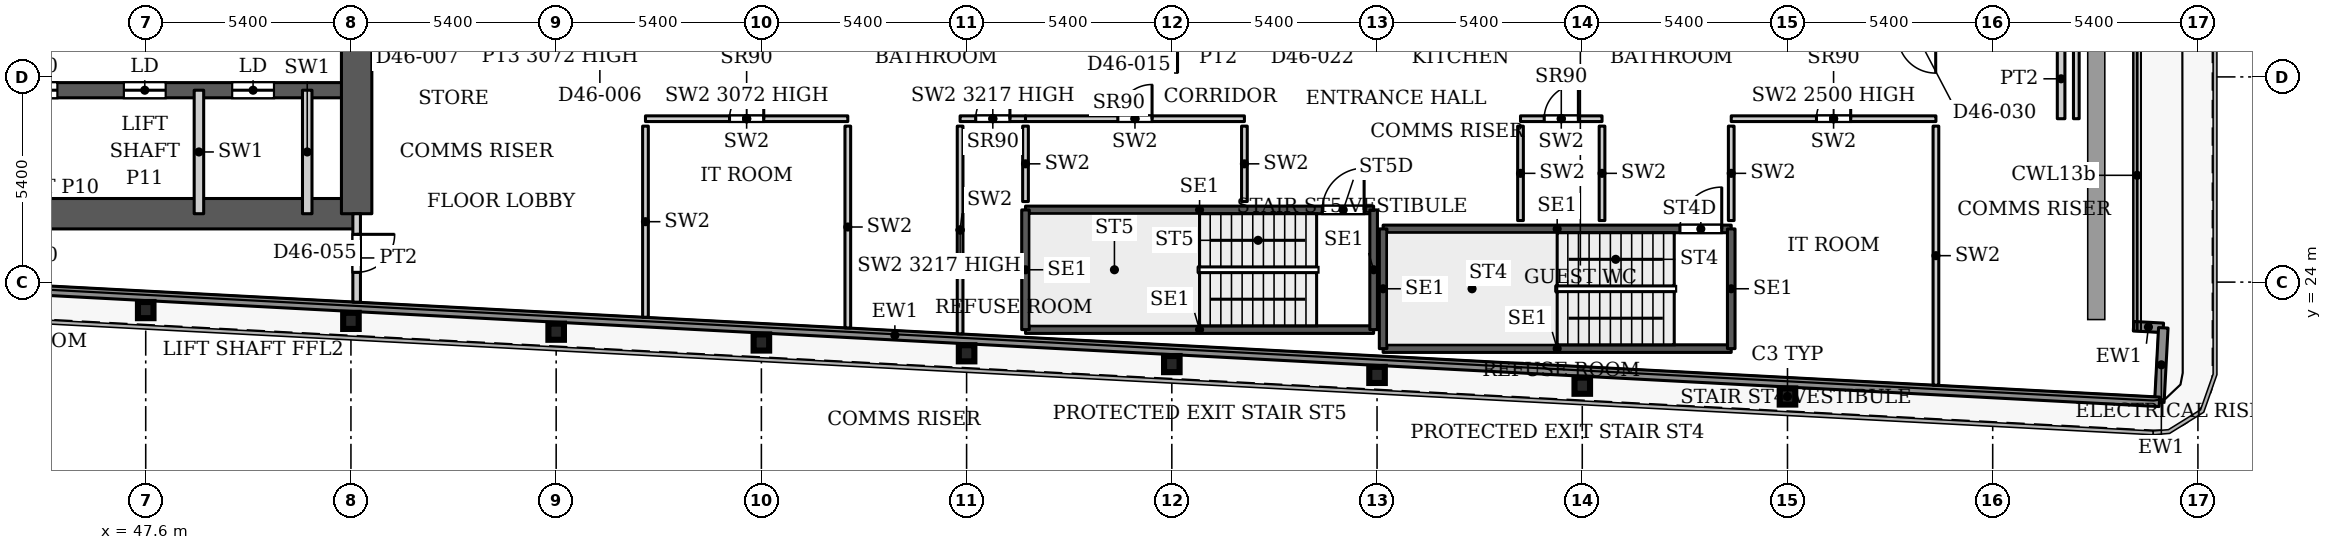
"""IFC4 building model, lengths in metres.
Left out: names, types, materials, properties, quantities, classifications, styles, units other than length and angle.
Written with IfcOpenShell. Run it as: python <this file> out.ifc"""

import sys

from ifc_helpers import new_model, si_unit, direction, frame, frame_2d, origin, origin_2d, place, context, subcontext, project, spatial, rectangle, i_section, extrude, source, transform, mapped, element, fill, save


model = new_model("IFC4")
c1 = context("Model", 3, precision=1e-05, world=origin(), true_north=direction((0.0, 1.0)))
c2 = subcontext(c1, "Body", "Model", "MODEL_VIEW")
j1 = project(units=[si_unit("LENGTHUNIT", "METRE"), si_unit("PLANEANGLEUNIT", "RADIAN")], contexts=[c1])
p1 = place(None, origin())
s1 = spatial("IfcSite", under=j1, at=p1, CompositionType="ELEMENT")
p2 = place(p1, origin())
s2 = spatial("IfcBuilding", under=s1, at=p2, CompositionType="ELEMENT")
p3 = place(p2, frame((0.0, 0.0, 199.4)))
s3 = spatial("IfcBuildingStorey", under=s2, at=p3, CompositionType="ELEMENT", Elevation=199.4)
for number, where, z_axis, x_axis in (
    (1, (90.8, 20.99, 0.0), (0.0, 0.0, 1.0), (1.0, 0.0, 0.0)),
    (2, (85.4, 21.274, 0.0), (0.0, 0.0, 1.0), (1.0, 0.0, 0.0)),
    (3, (80.0, 21.558, 0.0), (0.0, 0.0, 1.0), (1.0, 0.0, 0.0)),
    (4, (74.6, 21.843, 0.0), (0.0, 0.0, 1.0), (1.0, 0.0, 0.0)),
    (5, (69.2, 22.127, 0.0), (0.0, 0.0, 1.0), (1.0, 0.0, 0.0)),
    (6, (63.8, 22.411, 0.0), (0.0, 0.0, 1.0), (1.0, 0.0, 0.0)),
    (7, (58.4, 22.695, 0.0), (0.0, 0.0, 1.0), (1.0, 0.0, 0.0)),
    (8, (53.0, 22.98, 0.0), (0.0, 0.0, 1.0), (1.0, 0.0, 0.0)),
    (9, (47.6, 23.264, 0.0), (0.0, 0.0, 1.0), (1.0, 0.0, 0.0)),
):
    element("IfcColumn", number, at=place(p3, frame(where, z_axis=z_axis, x_axis=x_axis)), inside=s3, PredefinedType="COLUMN", context=c2, shape_type="SweptSolid", body=[
        extrude(i_section(OverallWidth=0.409, OverallDepth=0.425, WebThickness=0.033, FlangeThickness=0.052, FilletRadius=0.013, at=origin_2d()), origin(), (0.0, 0.0, 1.0), 3.9),
    ])
p4 = place(p3, frame((34.75, 25.8, 0.0), z_axis=(0.0, 0.0, 1.0), x_axis=(1.0, 0.0, 0.0)))
e10 = element("IfcWall", 10, at=p4, inside=s3, PredefinedType="SHEAR", context=c2, shape_type="SweptSolid", body=[
    extrude(rectangle(XDim=18.4, YDim=0.8, at=frame_2d((9.2, 0.0))), origin(), (0.0, 0.0, 1.0), 3.9),
])
p5 = place(p3, frame((34.75, 29.05, 0.0), z_axis=(0.0, 0.0, 1.0), x_axis=(1.0, 0.0, 0.0)))
e11 = element("IfcWall", 11, at=p5, inside=s3, PredefinedType="SHEAR", context=c2, shape_type="SweptSolid", body=[
    extrude(rectangle(XDim=18.4, YDim=0.4, at=frame_2d((9.2, 0.0))), origin(), (0.0, 0.0, 1.0), 3.9),
])
p6 = place(p5, frame((0.875, 0.0, 0.0)))
e12 = element("IfcOpeningElement", 12, at=p6, cuts=e11, PredefinedType="OPENING", context=c2, shape_type="SweptSolid", body=[
    extrude(rectangle(XDim=1.1, YDim=2.2, at=frame_2d((0.55, 1.1))), frame((0.0, 0.21, 0.0), z_axis=(0.0, -1.0, 0.0), x_axis=(1.0, 0.0, 0.0)), (0.0, 0.0, 1.0), 0.42),
])
p7 = place(p5, frame((3.725, 0.0, 0.0)))
e13 = element("IfcOpeningElement", 13, at=p7, cuts=e11, PredefinedType="OPENING", context=c2, shape_type="SweptSolid", body=[
    extrude(rectangle(XDim=1.1, YDim=2.2, at=frame_2d((0.55, 1.1))), frame((0.0, 0.21, 0.0), z_axis=(0.0, -1.0, 0.0), x_axis=(1.0, 0.0, 0.0)), (0.0, 0.0, 1.0), 0.42),
])
p8 = place(p5, frame((6.575, 0.0, 0.0)))
e14 = element("IfcOpeningElement", 14, at=p8, cuts=e11, PredefinedType="OPENING", context=c2, shape_type="SweptSolid", body=[
    extrude(rectangle(XDim=1.1, YDim=2.2, at=frame_2d((0.55, 1.1))), frame((0.0, 0.21, 0.0), z_axis=(0.0, -1.0, 0.0), x_axis=(1.0, 0.0, 0.0)), (0.0, 0.0, 1.0), 0.42),
])
p9 = place(p5, frame((9.425, 0.0, 0.0)))
e15 = element("IfcOpeningElement", 15, at=p9, cuts=e11, PredefinedType="OPENING", context=c2, shape_type="SweptSolid", body=[
    extrude(rectangle(XDim=1.1, YDim=2.2, at=frame_2d((0.55, 1.1))), frame((0.0, 0.21, 0.0), z_axis=(0.0, -1.0, 0.0), x_axis=(1.0, 0.0, 0.0)), (0.0, 0.0, 1.0), 0.42),
])
p10 = place(p5, frame((12.275, 0.0, 0.0)))
e16 = element("IfcOpeningElement", 16, at=p10, cuts=e11, PredefinedType="OPENING", context=c2, shape_type="SweptSolid", body=[
    extrude(rectangle(XDim=1.1, YDim=2.2, at=frame_2d((0.55, 1.1))), frame((0.0, 0.21, 0.0), z_axis=(0.0, -1.0, 0.0), x_axis=(1.0, 0.0, 0.0)), (0.0, 0.0, 1.0), 0.42),
])
p11 = place(p5, frame((15.125, 0.0, 0.0)))
e17 = element("IfcOpeningElement", 17, at=p11, cuts=e11, PredefinedType="OPENING", context=c2, shape_type="SweptSolid", body=[
    extrude(rectangle(XDim=1.1, YDim=2.2, at=frame_2d((0.55, 1.1))), frame((0.0, 0.21, 0.0), z_axis=(0.0, -1.0, 0.0), x_axis=(1.0, 0.0, 0.0)), (0.0, 0.0, 1.0), 0.42),
])
p12 = place(p3, frame((53.15, 25.8, 0.0), z_axis=(0.0, 0.0, 1.0), x_axis=(0.0, 1.0, 0.0)))
e18 = element("IfcWall", 18, at=p12, inside=s3, PredefinedType="SHEAR", context=c2, shape_type="SweptSolid", body=[
    extrude(rectangle(XDim=10.4, YDim=0.8, at=frame_2d((5.2, 0.0))), origin(), (0.0, 0.0, 1.0), 3.9),
])
p13 = place(p3, frame((99.907, 22.839, 0.0), z_axis=(0.0, 0.0, 1.0), x_axis=(0.998561284263, -0.053622398031, 0.0)))
e19 = element("IfcWall", 19, at=p13, inside=s3, PredefinedType="SOLIDWALL", context=c2, shape_type="SweptSolid", body=[
    extrude(rectangle(XDim=0.783, YDim=0.25, at=frame_2d((0.392, 0.0))), origin(), (0.0, 0.0, 1.0), 3.75),
])
p14 = place(p3, frame((100.689, 22.797, 0.0), z_axis=(0.0, 0.0, 1.0), x_axis=(-0.052841433274, -0.998602915542, 0.0)))
e20 = element("IfcWall", 20, at=p14, inside=s3, PredefinedType="SOLIDWALL", context=c2, shape_type="SweptSolid", body=[
    extrude(rectangle(XDim=1.95, YDim=0.25, at=frame_2d((0.975, 0.0))), origin(), (0.0, 0.0, 1.0), 3.75),
])
p15 = place(p3, frame((100.586, 20.85, 0.0), z_axis=(0.0, 0.0, 1.0), x_axis=(-0.99861746497, 0.052565755559, 0.0)))
e21 = element("IfcWall", 21, at=p15, inside=s3, PredefinedType="SOLIDWALL", context=c2, shape_type="SweptSolid", body=[
    extrude(rectangle(XDim=66.639, YDim=0.25, at=frame_2d((33.319, 0.0))), origin(), (0.0, 0.0, 1.0), 3.75),
])
p16 = place(p3, frame((80.16, 22.25, 0.0), z_axis=(0.0, 0.0, 1.0), x_axis=(1.0, 0.0, 0.0)))
e22 = element("IfcWall", 22, at=p16, inside=s3, PredefinedType="SHEAR", context=c2, shape_type="SweptSolid", body=[
    extrude(rectangle(XDim=9.16, YDim=0.2, at=frame_2d((4.58, 0.0))), origin(), (0.0, 0.0, 1.0), 3.9),
])
p17 = place(p3, frame((80.16, 25.4, 0.0), z_axis=(0.0, 0.0, 1.0), x_axis=(1.0, 0.0, 0.0)))
e23 = element("IfcWall", 23, at=p17, inside=s3, PredefinedType="SHEAR", context=c2, shape_type="SweptSolid", body=[
    extrude(rectangle(XDim=9.16, YDim=0.2, at=frame_2d((4.58, 0.0))), origin(), (0.0, 0.0, 1.0), 3.9),
])
p18 = place(p17, frame((7.81, 0.0, 0.0)))
e24 = element("IfcOpeningElement", 24, at=p18, cuts=e23, PredefinedType="OPENING", context=c2, shape_type="SweptSolid", body=[
    extrude(rectangle(XDim=1.1, YDim=2.2, at=frame_2d((0.55, 1.1))), frame((0.0, 0.11, 0.0), z_axis=(0.0, -1.0, 0.0), x_axis=(1.0, 0.0, 0.0)), (0.0, 0.0, 1.0), 0.22),
])
for number, where, z_axis, x_axis in (
    (25, (80.16, 22.25, 0.0), (0.0, 0.0, 1.0), (0.0, 1.0, 0.0)),
    (26, (89.32, 22.25, 0.0), (0.0, 0.0, 1.0), (0.0, 1.0, 0.0)),
):
    element("IfcWall", number, at=place(p3, frame(where, z_axis=z_axis, x_axis=x_axis)), inside=s3, PredefinedType="SHEAR", context=c2, shape_type="SweptSolid", body=[
        extrude(rectangle(XDim=3.15, YDim=0.2, at=frame_2d((1.575, 0.0))), origin(), (0.0, 0.0, 1.0), 3.9),
    ])
p19 = place(p3, frame((70.75, 22.75, 0.0), z_axis=(0.0, 0.0, 1.0), x_axis=(1.0, 0.0, 0.0)))
e27 = element("IfcWall", 27, at=p19, inside=s3, PredefinedType="SHEAR", context=c2, shape_type="SweptSolid", body=[
    extrude(rectangle(XDim=9.16, YDim=0.2, at=frame_2d((4.58, 0.0))), origin(), (0.0, 0.0, 1.0), 3.9),
])
p20 = place(p3, frame((70.75, 25.9, 0.0), z_axis=(0.0, 0.0, 1.0), x_axis=(1.0, 0.0, 0.0)))
e28 = element("IfcWall", 28, at=p20, inside=s3, PredefinedType="SHEAR", context=c2, shape_type="SweptSolid", body=[
    extrude(rectangle(XDim=9.16, YDim=0.2, at=frame_2d((4.58, 0.0))), origin(), (0.0, 0.0, 1.0), 3.9),
])
p21 = place(p20, frame((7.81, 0.0, 0.0)))
e29 = element("IfcOpeningElement", 29, at=p21, cuts=e28, PredefinedType="OPENING", context=c2, shape_type="SweptSolid", body=[
    extrude(rectangle(XDim=1.1, YDim=2.2, at=frame_2d((0.55, 1.1))), frame((0.0, 0.11, 0.0), z_axis=(0.0, -1.0, 0.0), x_axis=(1.0, 0.0, 0.0)), (0.0, 0.0, 1.0), 0.22),
])
for number, where, z_axis, x_axis in (
    (30, (70.75, 22.75, 0.0), (0.0, 0.0, 1.0), (0.0, 1.0, 0.0)),
    (31, (79.91, 22.75, 0.0), (0.0, 0.0, 1.0), (0.0, 1.0, 0.0)),
):
    element("IfcWall", number, at=place(p3, frame(where, z_axis=z_axis, x_axis=x_axis)), inside=s3, PredefinedType="SHEAR", context=c2, shape_type="SweptSolid", body=[
        extrude(rectangle(XDim=3.15, YDim=0.2, at=frame_2d((1.575, 0.0))), origin(), (0.0, 0.0, 1.0), 3.9),
    ])
for number, where, z_axis, x_axis in (
    (32, (49.0, 25.8, 0.0), (0.0, 0.0, 1.0), (0.0, 1.0, 0.0)),
    (33, (51.85, 25.8, 0.0), (0.0, 0.0, 1.0), (0.0, 1.0, 0.0)),
):
    element("IfcWall", number, at=place(p3, frame(where, z_axis=z_axis, x_axis=x_axis)), inside=s3, PredefinedType="PARTITIONING", context=c2, shape_type="SweptSolid", body=[
        extrude(rectangle(XDim=3.25, YDim=0.25, at=frame_2d((1.625, 0.0))), origin(), (0.0, 0.0, 1.0), 3.9),
    ])
p22 = place(p3, frame((60.75, 28.3, 0.0), z_axis=(0.0, 0.0, 1.0), x_axis=(1.0, 0.0, 0.0)))
e34 = element("IfcWall", 34, at=p22, inside=s3, PredefinedType="PARTITIONING", context=c2, shape_type="SweptSolid", body=[
    extrude(rectangle(XDim=5.324, YDim=0.15, at=frame_2d((2.662, 0.0))), origin(), (0.0, 0.0, 1.0), 3.072),
])
p23 = place(p22, frame((2.212, 0.0, 0.0)))
e35 = element("IfcOpeningElement", 35, at=p23, cuts=e34, PredefinedType="OPENING", context=c2, shape_type="SweptSolid", body=[
    extrude(rectangle(XDim=0.9, YDim=2.2, at=frame_2d((0.45, 1.1))), frame((0.0, 0.085, 0.0), z_axis=(0.0, -1.0, 0.0), x_axis=(1.0, 0.0, 0.0)), (0.0, 0.0, 1.0), 0.17),
])
p24 = place(p3, frame((60.75, 23.075, 0.0), z_axis=(0.0, 0.0, 1.0), x_axis=(0.0, 1.0, 0.0)))
e36 = element("IfcWall", 36, at=p24, inside=s3, PredefinedType="PARTITIONING", context=c2, shape_type="SweptSolid", body=[
    extrude(rectangle(XDim=5.03, YDim=0.15, at=frame_2d((2.515, 0.0))), origin(), (0.0, 0.0, 1.0), 3.9),
])
p25 = place(p3, frame((66.074, 22.795, 0.0), z_axis=(0.0, 0.0, 1.0), x_axis=(0.0, 1.0, 0.0)))
e37 = element("IfcWall", 37, at=p25, inside=s3, PredefinedType="PARTITIONING", context=c2, shape_type="SweptSolid", body=[
    extrude(rectangle(XDim=5.31, YDim=0.15, at=frame_2d((2.655, 0.0))), origin(), (0.0, 0.0, 1.0), 3.9),
])
p26 = place(p3, frame((69.029, 28.3, 0.0), z_axis=(0.0, 0.0, 1.0), x_axis=(1.0, 0.0, 0.0)))
e38 = element("IfcWall", 38, at=p26, inside=s3, PredefinedType="PARTITIONING", context=c2, shape_type="SweptSolid", body=[
    extrude(rectangle(XDim=1.721, YDim=0.15, at=frame_2d((0.86, 0.0))), origin(), (0.0, 0.0, 1.0), 3.217),
])
p27 = place(p26, frame((0.411, 0.0, 0.0)))
e39 = element("IfcOpeningElement", 39, at=p27, cuts=e38, PredefinedType="OPENING", context=c2, shape_type="SweptSolid", body=[
    extrude(rectangle(XDim=0.9, YDim=2.2, at=frame_2d((0.45, 1.1))), frame((0.0, 0.085, 0.0), z_axis=(0.0, -1.0, 0.0), x_axis=(1.0, 0.0, 0.0)), (0.0, 0.0, 1.0), 0.17),
])
p28 = place(p3, frame((69.029, 22.639, 0.0), z_axis=(0.0, 0.0, 1.0), x_axis=(0.0, 1.0, 0.0)))
e40 = element("IfcWall", 40, at=p28, inside=s3, PredefinedType="PARTITIONING", context=c2, shape_type="SweptSolid", body=[
    extrude(rectangle(XDim=5.466, YDim=0.15, at=frame_2d((2.733, 0.0))), origin(), (0.0, 0.0, 1.0), 3.217),
])
p29 = place(p3, frame((70.75, 26.12, 0.0), z_axis=(0.0, 0.0, 1.0), x_axis=(0.0, 1.0, 0.0)))
e41 = element("IfcWall", 41, at=p29, inside=s3, PredefinedType="PARTITIONING", context=c2, shape_type="SweptSolid", body=[
    extrude(rectangle(XDim=1.985, YDim=0.15, at=frame_2d((0.992, 0.0))), origin(), (0.0, 0.0, 1.0), 3.9),
])
p30 = place(p3, frame((70.75, 28.3, 0.0), z_axis=(0.0, 0.0, 1.0), x_axis=(1.0, 0.0, 0.0)))
e42 = element("IfcWall", 42, at=p30, inside=s3, PredefinedType="PARTITIONING", context=c2, shape_type="SweptSolid", body=[
    extrude(rectangle(XDim=5.76, YDim=0.15, at=frame_2d((2.88, 0.0))), origin(), (0.0, 0.0, 1.0), 3.9),
])
p31 = place(p30, frame((2.43, 0.0, 0.0)))
e43 = element("IfcOpeningElement", 43, at=p31, cuts=e42, PredefinedType="OPENING", context=c2, shape_type="SweptSolid", body=[
    extrude(rectangle(XDim=0.9, YDim=2.2, at=frame_2d((0.45, 1.1))), frame((0.0, 0.085, 0.0), z_axis=(0.0, -1.0, 0.0), x_axis=(1.0, 0.0, 0.0)), (0.0, 0.0, 1.0), 0.17),
])
p32 = place(p3, frame((76.51, 26.12, 0.0), z_axis=(0.0, 0.0, 1.0), x_axis=(0.0, 1.0, 0.0)))
e44 = element("IfcWall", 44, at=p32, inside=s3, PredefinedType="PARTITIONING", context=c2, shape_type="SweptSolid", body=[
    extrude(rectangle(XDim=1.985, YDim=0.15, at=frame_2d((0.992, 0.0))), origin(), (0.0, 0.0, 1.0), 3.9),
])
p33 = place(p3, frame((83.775, 28.3, 0.0), z_axis=(0.0, 0.0, 1.0), x_axis=(1.0, 0.0, 0.0)))
e45 = element("IfcWall", 45, at=p33, inside=s3, PredefinedType="PARTITIONING", context=c2, shape_type="SweptSolid", body=[
    extrude(rectangle(XDim=2.145, YDim=0.15, at=frame_2d((1.073, 0.0))), origin(), (0.0, 0.0, 1.0), 3.9),
])
p34 = place(p33, frame((0.623, 0.0, 0.0)))
e46 = element("IfcOpeningElement", 46, at=p34, cuts=e45, PredefinedType="OPENING", context=c2, shape_type="SweptSolid", body=[
    extrude(rectangle(XDim=0.9, YDim=2.2, at=frame_2d((0.45, 1.1))), frame((0.0, 0.085, 0.0), z_axis=(0.0, -1.0, 0.0), x_axis=(1.0, 0.0, 0.0)), (0.0, 0.0, 1.0), 0.17),
])
for number, where, z_axis, x_axis in (
    (47, (83.775, 25.62, 0.0), (0.0, 0.0, 1.0), (0.0, 1.0, 0.0)),
    (48, (85.92, 25.62, 0.0), (0.0, 0.0, 1.0), (0.0, 1.0, 0.0)),
):
    element("IfcWall", number, at=place(p3, frame(where, z_axis=z_axis, x_axis=x_axis)), inside=s3, PredefinedType="PARTITIONING", context=c2, shape_type="SweptSolid", body=[
        extrude(rectangle(XDim=2.485, YDim=0.15, at=frame_2d((1.242, 0.0))), origin(), (0.0, 0.0, 1.0), 3.9),
    ])
p35 = place(p3, frame((89.32, 28.3, 0.0), z_axis=(0.0, 0.0, 1.0), x_axis=(1.0, 0.0, 0.0)))
e49 = element("IfcWall", 49, at=p35, inside=s3, PredefinedType="PARTITIONING", context=c2, shape_type="SweptSolid", body=[
    extrude(rectangle(XDim=5.386, YDim=0.15, at=frame_2d((2.693, 0.0))), origin(), (0.0, 0.0, 1.0), 2.5),
])
p36 = place(p35, frame((2.243, 0.0, 0.0)))
e50 = element("IfcOpeningElement", 50, at=p36, cuts=e49, PredefinedType="OPENING", context=c2, shape_type="SweptSolid", body=[
    extrude(rectangle(XDim=0.9, YDim=2.2, at=frame_2d((0.45, 1.1))), frame((0.0, 0.085, 0.0), z_axis=(0.0, -1.0, 0.0), x_axis=(1.0, 0.0, 0.0)), (0.0, 0.0, 1.0), 0.17),
])
p37 = place(p3, frame((89.32, 25.62, 0.0), z_axis=(0.0, 0.0, 1.0), x_axis=(0.0, 1.0, 0.0)))
e51 = element("IfcWall", 51, at=p37, inside=s3, PredefinedType="PARTITIONING", context=c2, shape_type="SweptSolid", body=[
    extrude(rectangle(XDim=2.485, YDim=0.15, at=frame_2d((1.242, 0.0))), origin(), (0.0, 0.0, 1.0), 3.9),
])
p38 = place(p3, frame((94.706, 21.287, 0.0), z_axis=(0.0, 0.0, 1.0), x_axis=(0.0, 1.0, 0.0)))
e52 = element("IfcWall", 52, at=p38, inside=s3, PredefinedType="PARTITIONING", context=c2, shape_type="SweptSolid", body=[
    extrude(rectangle(XDim=6.818, YDim=0.15, at=frame_2d((3.409, 0.0))), origin(), (0.0, 0.0, 1.0), 3.9),
])
p39 = place(p3, frame((53.15, 23.472, 0.0), z_axis=(0.0, 0.0, 1.0), x_axis=(0.0, 1.0, 0.0)))
e53 = element("IfcWall", 53, at=p39, inside=s3, PredefinedType="PARTITIONING", context=c2, shape_type="SweptSolid", body=[
    extrude(rectangle(XDim=2.328, YDim=0.2, at=frame_2d((1.164, 0.0))), origin(), (0.0, 0.0, 1.0), 3.6),
])
p40 = place(p39, frame((0.785, 0.0, 0.0)))
e54 = element("IfcOpeningElement", 54, at=p40, cuts=e53, PredefinedType="OPENING", context=c2, shape_type="SweptSolid", body=[
    extrude(rectangle(XDim=1.0, YDim=2.1, at=frame_2d((0.5, 1.05))), frame((0.0, 0.11, 0.0), z_axis=(0.0, -1.0, 0.0), x_axis=(1.0, 0.0, 0.0)), (0.0, 0.0, 1.0), 0.22),
])
p41 = place(p3, frame((98.0, 28.3, 0.0), z_axis=(0.0, 0.0, 1.0), x_axis=(0.0, 1.0, 0.0)))
e55 = element("IfcWall", 55, at=p41, inside=s3, PredefinedType="PARTITIONING", context=c2, shape_type="SweptSolid", body=[
    extrude(rectangle(XDim=2.1, YDim=0.2, at=frame_2d((1.05, 0.0))), origin(), (0.0, 0.0, 1.0), 3.6),
])
p42 = place(p3, frame((98.4, 28.3, 0.0), z_axis=(0.0, 0.0, 1.0), x_axis=(0.0, 1.0, 0.0)))
e56 = element("IfcWall", 56, at=p42, inside=s3, PredefinedType="PARTITIONING", context=c2, shape_type="SweptSolid", body=[
    extrude(rectangle(XDim=5.325, YDim=0.15, at=frame_2d((2.663, 0.0))), origin(), (0.0, 0.0, 1.0), 3.6),
])
m1 = source(origin(), c2, "Body", "SweptSolid", [
    extrude(rectangle(XDim=1.1, YDim=2.2, at=frame_2d((0.55, 1.1))), frame((0.0, 0.025, 0.0), z_axis=(0.0, -1.0, 0.0), x_axis=(1.0, 0.0, 0.0)), (0.0, 0.0, 1.0), 0.05),
])
p43 = place(p9, origin())
e57 = element("IfcDoor", 57, at=p43, inside=s3, OperationType="SLIDING_TO_LEFT", PredefinedType="DOOR", context=c2, shape_type="MappedRepresentation", body=[
    mapped(m1, transform((0.0, 0.0, 0.0), x_axis=(1.0, 0.0, 0.0), y_axis=(0.0, 1.0, 0.0), z_axis=(0.0, 0.0, 1.0), scale=1.0)),
])
fill(e15, e57)
p44 = place(p10, origin())
e58 = element("IfcDoor", 58, at=p44, inside=s3, OperationType="SLIDING_TO_LEFT", PredefinedType="DOOR", context=c2, shape_type="MappedRepresentation", body=[
    mapped(m1, transform((0.0, 0.0, 0.0), x_axis=(1.0, 0.0, 0.0), y_axis=(0.0, 1.0, 0.0), z_axis=(0.0, 0.0, 1.0), scale=1.0)),
])
fill(e16, e58)
p45 = place(p11, origin())
e59 = element("IfcDoor", 59, at=p45, inside=s3, OperationType="SLIDING_TO_LEFT", PredefinedType="DOOR", context=c2, shape_type="MappedRepresentation", body=[
    mapped(m1, transform((0.0, 0.0, 0.0), x_axis=(1.0, 0.0, 0.0), y_axis=(0.0, 1.0, 0.0), z_axis=(0.0, 0.0, 1.0), scale=1.0)),
])
fill(e17, e59)
m2 = source(origin(), c2, "Body", "SweptSolid", [
    extrude(rectangle(XDim=0.9, YDim=2.2, at=frame_2d((0.45, 1.1))), frame((0.0, 0.025, 0.0), z_axis=(0.0, -1.0, 0.0), x_axis=(1.0, 0.0, 0.0)), (0.0, 0.0, 1.0), 0.05),
])
p46 = place(p23, origin())
e60 = element("IfcDoor", 60, at=p46, inside=s3, OperationType="SINGLE_SWING_LEFT", PredefinedType="DOOR", context=c2, shape_type="MappedRepresentation", body=[
    mapped(m2, transform((0.0, 0.0, 0.0), x_axis=(1.0, 0.0, 0.0), y_axis=(0.0, 1.0, 0.0), z_axis=(0.0, 0.0, 1.0), scale=1.0)),
])
fill(e35, e60)
p47 = place(p27, origin())
e61 = element("IfcDoor", 61, at=p47, inside=s3, OperationType="SINGLE_SWING_LEFT", PredefinedType="DOOR", context=c2, shape_type="MappedRepresentation", body=[
    mapped(m2, transform((0.0, 0.0, 0.0), x_axis=(1.0, 0.0, 0.0), y_axis=(0.0, 1.0, 0.0), z_axis=(0.0, 0.0, 1.0), scale=1.0)),
])
fill(e39, e61)
p48 = place(p31, origin())
e62 = element("IfcDoor", 62, at=p48, inside=s3, OperationType="SINGLE_SWING_LEFT", PredefinedType="DOOR", context=c2, shape_type="MappedRepresentation", body=[
    mapped(m2, transform((0.0, 0.0, 0.0), x_axis=(1.0, 0.0, 0.0), y_axis=(0.0, 1.0, 0.0), z_axis=(0.0, 0.0, 1.0), scale=1.0)),
])
fill(e43, e62)
p49 = place(p34, origin())
e63 = element("IfcDoor", 63, at=p49, inside=s3, OperationType="SINGLE_SWING_LEFT", PredefinedType="DOOR", context=c2, shape_type="MappedRepresentation", body=[
    mapped(m2, transform((0.0, 0.0, 0.0), x_axis=(1.0, 0.0, 0.0), y_axis=(0.0, 1.0, 0.0), z_axis=(0.0, 0.0, 1.0), scale=1.0)),
])
fill(e46, e63)
p50 = place(p36, origin())
e64 = element("IfcDoor", 64, at=p50, inside=s3, OperationType="SINGLE_SWING_LEFT", PredefinedType="DOOR", context=c2, shape_type="MappedRepresentation", body=[
    mapped(m2, transform((0.0, 0.0, 0.0), x_axis=(1.0, 0.0, 0.0), y_axis=(0.0, 1.0, 0.0), z_axis=(0.0, 0.0, 1.0), scale=1.0)),
])
fill(e50, e64)
m3 = source(origin(), c2, "Body", "SweptSolid", [
    extrude(rectangle(XDim=1.1, YDim=2.2, at=frame_2d((0.55, 1.1))), frame((0.0, 0.025, 0.0), z_axis=(0.0, -1.0, 0.0), x_axis=(1.0, 0.0, 0.0)), (0.0, 0.0, 1.0), 0.05),
])
p51 = place(p18, origin())
e65 = element("IfcDoor", 65, at=p51, inside=s3, OperationType="SINGLE_SWING_LEFT", PredefinedType="DOOR", context=c2, shape_type="MappedRepresentation", body=[
    mapped(m3, transform((0.0, 0.0, 0.0), x_axis=(1.0, 0.0, 0.0), y_axis=(0.0, 1.0, 0.0), z_axis=(0.0, 0.0, 1.0), scale=1.0)),
])
fill(e24, e65)
p52 = place(p21, origin())
e66 = element("IfcDoor", 66, at=p52, inside=s3, OperationType="SINGLE_SWING_LEFT", PredefinedType="DOOR", context=c2, shape_type="MappedRepresentation", body=[
    mapped(m3, transform((0.0, 0.0, 0.0), x_axis=(1.0, 0.0, 0.0), y_axis=(0.0, 1.0, 0.0), z_axis=(0.0, 0.0, 1.0), scale=1.0)),
])
fill(e29, e66)
m4 = source(origin(), c2, "Body", "SweptSolid", [
    extrude(rectangle(XDim=1.0, YDim=2.1, at=frame_2d((0.5, 1.05))), frame((0.0, 0.025, 0.0), z_axis=(0.0, -1.0, 0.0), x_axis=(1.0, 0.0, 0.0)), (0.0, 0.0, 1.0), 0.05),
])
p53 = place(p40, origin())
e67 = element("IfcDoor", 67, at=p53, inside=s3, OperationType="SINGLE_SWING_RIGHT", PredefinedType="DOOR", context=c2, shape_type="MappedRepresentation", body=[
    mapped(m4, transform((0.0, 0.0, 0.0), x_axis=(1.0, 0.0, 0.0), y_axis=(0.0, 1.0, 0.0), z_axis=(0.0, 0.0, 1.0), scale=1.0)),
])
fill(e54, e67)
save(model, sys.argv[1])
